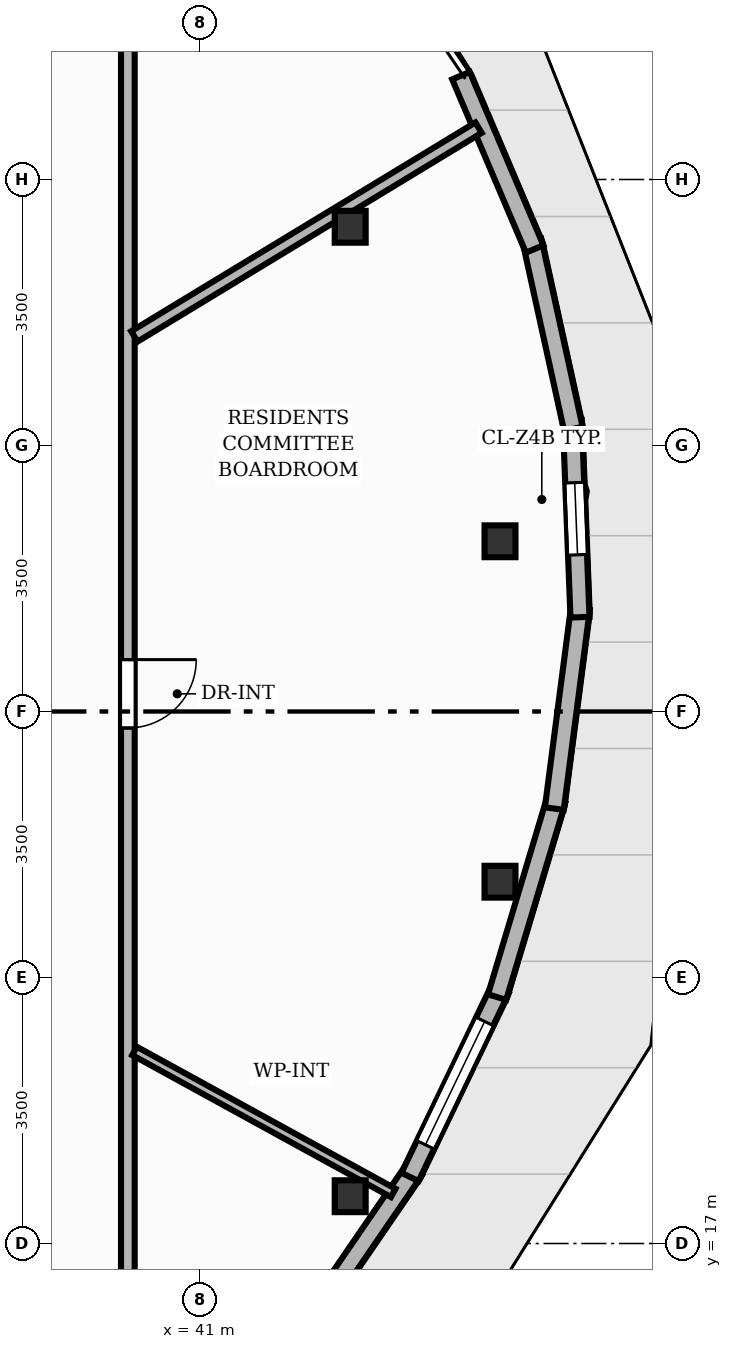
"""IFC4 building model, lengths in metres.
Left out: names, types, materials, properties, quantities, classifications, styles, units other than length and angle.
Written with IfcOpenShell. Run it as: python <this file> out.ifc"""

import sys

from ifc_helpers import new_model, si_unit, direction, frame, frame_2d, origin, origin_2d, place, context, subcontext, project, spatial, rectangle, i_section, extrude, element, fill, save


model = new_model("IFC4")
c1 = context("Model", 3, precision=1e-05, world=origin(), true_north=direction((0.0, 1.0)))
c2 = subcontext(c1, "Body", "Model", "MODEL_VIEW")
j1 = project(units=[si_unit("LENGTHUNIT", "METRE"), si_unit("PLANEANGLEUNIT", "RADIAN")], contexts=[c1])
p1 = place(None, origin())
s1 = spatial("IfcSite", under=j1, at=p1, CompositionType="ELEMENT")
p2 = place(p1, origin())
s2 = spatial("IfcBuilding", under=s1, at=p2, CompositionType="ELEMENT")
p3 = place(p2, frame((0.0, 0.0, 204.64)))
s3 = spatial("IfcBuildingStorey", under=s2, at=p3, CompositionType="ELEMENT", Elevation=204.64)
for number, where, z_axis, x_axis in (
    (1, (44.946, 26.24, 0.0), (0.0, 0.0, 1.0), (1.0, 0.0, 0.0)),
    (2, (42.975, 30.378, 0.0), (0.0, 0.0, 1.0), (1.0, 0.0, 0.0)),
    (3, (42.975, 17.622, 0.0), (0.0, 0.0, 1.0), (1.0, 0.0, 0.0)),
    (4, (44.946, 21.76, 0.0), (0.0, 0.0, 1.0), (1.0, 0.0, 0.0)),
):
    element("IfcColumn", number, at=place(p3, frame(where, z_axis=z_axis, x_axis=x_axis)), inside=s3, PredefinedType="COLUMN", context=c2, shape_type="SweptSolid", body=[
        extrude(i_section(OverallWidth=0.407, OverallDepth=0.419, WebThickness=0.031, FlangeThickness=0.049, at=origin_2d()), origin(), (0.0, 0.0, 1.0), 3.2),
    ])
p4 = place(p3, frame((43.817, 17.97, 0.0), z_axis=(0.0, 0.0, 1.0), x_axis=(-0.565115417993, -0.825011857095, 0.0)))
e5 = element("IfcWall", 5, at=p4, inside=s3, PredefinedType="SOLIDWALL", context=c2, shape_type="SweptSolid", body=[
    extrude(rectangle(XDim=2.758, YDim=0.25, at=frame_2d((1.379, 0.0))), origin(), (0.0, 0.0, 1.0), 2.96),
])
p5 = place(p3, frame((44.948, 20.344, 0.0), z_axis=(0.0, 0.0, 1.0), x_axis=(-0.432820910529, -0.901479927347, 0.0)))
e6 = element("IfcWall", 6, at=p5, inside=s3, PredefinedType="SOLIDWALL", context=c2, shape_type="SweptSolid", body=[
    extrude(rectangle(XDim=2.739, YDim=0.25, at=frame_2d((1.369, 0.0))), origin(), (0.0, 0.0, 1.0), 2.96),
])
p6 = place(p5, frame((0.469, 0.0, 0.85)))
e7 = element("IfcOpeningElement", 7, at=p6, cuts=e6, PredefinedType="OPENING", context=c2, shape_type="SweptSolid", body=[
    extrude(rectangle(XDim=1.8, YDim=2.0, at=frame_2d((0.9, 1.0))), frame((0.0, 0.135, 0.0), z_axis=(0.0, -1.0, 0.0), x_axis=(1.0, 0.0, 0.0)), (0.0, 0.0, 1.0), 0.27),
])
p7 = place(p3, frame((45.684, 22.83, 0.0), z_axis=(0.0, 0.0, 1.0), x_axis=(-0.287206932984, -0.957868559692, 0.0)))
e8 = element("IfcWall", 8, at=p7, inside=s3, PredefinedType="SOLIDWALL", context=c2, shape_type="SweptSolid", body=[
    extrude(rectangle(XDim=2.701, YDim=0.25, at=frame_2d((1.351, 0.0))), origin(), (0.0, 0.0, 1.0), 2.577),
])
p8 = place(p3, frame((46.004, 25.352, 0.0), z_axis=(0.0, 0.0, 1.0), x_axis=(-0.129291941608, -0.991606572102, 0.0)))
e9 = element("IfcWall", 9, at=p8, inside=s3, PredefinedType="SOLIDWALL", context=c2, shape_type="SweptSolid", body=[
    extrude(rectangle(XDim=2.651, YDim=0.25, at=frame_2d((1.326, 0.0))), origin(), (0.0, 0.0, 1.0), 2.96),
])
p9 = place(p3, frame((45.897, 27.831, 0.0), z_axis=(0.0, 0.0, 1.0), x_axis=(0.0391781915, -0.999232239928, 0.0)))
e10 = element("IfcWall", 10, at=p9, inside=s3, PredefinedType="SOLIDWALL", context=c2, shape_type="SweptSolid", body=[
    extrude(rectangle(XDim=2.592, YDim=0.25, at=frame_2d((1.296, 0.0))), origin(), (0.0, 0.0, 1.0), 2.96),
])
p10 = place(p9, frame((0.821, 0.0, 0.85)))
e11 = element("IfcOpeningElement", 11, at=p10, cuts=e10, PredefinedType="OPENING", context=c2, shape_type="SweptSolid", body=[
    extrude(rectangle(XDim=0.95, YDim=1.45, at=frame_2d((0.475, 0.725))), frame((0.0, 0.135, 0.0), z_axis=(0.0, -1.0, 0.0), x_axis=(1.0, 0.0, 0.0)), (0.0, 0.0, 1.0), 0.27),
])
p11 = place(p3, frame((45.368, 30.193, 0.0), z_axis=(0.0, 0.0, 1.0), x_axis=(0.214642879542, -0.976692599676, 0.0)))
e12 = element("IfcWall", 12, at=p11, inside=s3, PredefinedType="SOLIDWALL", context=c2, shape_type="SweptSolid", body=[
    extrude(rectangle(XDim=2.532, YDim=0.25, at=frame_2d((1.266, 0.0))), origin(), (0.0, 0.0, 1.0), 2.96),
])
p12 = place(p3, frame((44.433, 32.366, 0.0), z_axis=(0.0, 0.0, 1.0), x_axis=(0.391230346066, -0.920292788365, 0.0)))
e13 = element("IfcWall", 13, at=p12, inside=s3, PredefinedType="SOLIDWALL", context=c2, shape_type="SweptSolid", body=[
    extrude(rectangle(XDim=2.478, YDim=0.25, at=frame_2d((1.239, 0.0))), origin(), (0.0, 0.0, 1.0), 2.96),
])
p13 = place(p3, frame((40.05, 33.55, 0.0), z_axis=(0.0, 0.0, 1.0), x_axis=(0.0, -1.0, 0.0)))
e14 = element("IfcWall", 14, at=p13, inside=s3, PredefinedType="PARTITIONING", context=c2, shape_type="SweptSolid", body=[
    extrude(rectangle(XDim=19.1, YDim=0.18, at=frame_2d((9.55, 0.0))), origin(), (0.0, 0.0, 1.0), 2.955),
])
p14 = place(p13, frame((8.867, 0.0, 0.0)))
e15 = element("IfcOpeningElement", 15, at=p14, cuts=e14, PredefinedType="OPENING", context=c2, shape_type="SweptSolid", body=[
    extrude(rectangle(XDim=0.9, YDim=2.1, at=frame_2d((0.45, 1.05))), frame((0.0, 0.1, 0.0), z_axis=(0.0, -1.0, 0.0), x_axis=(1.0, 0.0, 0.0)), (0.0, 0.0, 1.0), 0.2),
])
p15 = place(p3, frame((40.138, 19.534, 0.0), z_axis=(0.0, 0.0, 1.0), x_axis=(0.876643036825, -0.481141336809, 0.0)))
e16 = element("IfcWall", 16, at=p15, inside=s3, PredefinedType="PARTITIONING", context=c2, shape_type="SweptSolid", body=[
    extrude(rectangle(XDim=3.883, YDim=0.125, at=frame_2d((1.941, 0.0))), origin(), (0.0, 0.0, 1.0), 2.404),
])
p16 = place(p3, frame((40.135, 28.935, 0.0), z_axis=(0.0, 0.0, 1.0), x_axis=(0.854997779071, 0.518631659064, 0.0)))
e17 = element("IfcWall", 17, at=p16, inside=s3, PredefinedType="PLUMBINGWALL", context=c2, shape_type="SweptSolid", body=[
    extrude(rectangle(XDim=5.296, YDim=0.16, at=frame_2d((2.648, 0.0))), origin(), (0.0, 0.0, 1.0), 2.404),
])
p17 = place(p6, origin())
e18 = element("IfcWindow", 18, at=p17, inside=s3, PartitioningType="SINGLE_PANEL", PredefinedType="WINDOW", context=c2, shape_type="SweptSolid", body=[
    extrude(rectangle(XDim=1.8, YDim=2.0, at=frame_2d((0.9, 1.0))), frame((0.0, 0.03, 0.0), z_axis=(0.0, -1.0, 0.0), x_axis=(1.0, 0.0, 0.0)), (0.0, 0.0, 1.0), 0.06),
])
fill(e7, e18)
p18 = place(p10, origin())
e19 = element("IfcWindow", 19, at=p18, inside=s3, PartitioningType="SINGLE_PANEL", PredefinedType="WINDOW", context=c2, shape_type="SweptSolid", body=[
    extrude(rectangle(XDim=0.95, YDim=1.45, at=frame_2d((0.475, 0.725))), frame((0.0, 0.03, 0.0), z_axis=(0.0, -1.0, 0.0), x_axis=(1.0, 0.0, 0.0)), (0.0, 0.0, 1.0), 0.06),
])
fill(e11, e19)
p19 = place(p14, origin())
e20 = element("IfcDoor", 20, at=p19, inside=s3, OperationType="SINGLE_SWING_LEFT", PredefinedType="DOOR", context=c2, shape_type="SweptSolid", body=[
    extrude(rectangle(XDim=0.9, YDim=2.1, at=frame_2d((0.45, 1.05))), frame((0.0, 0.025, 0.0), z_axis=(0.0, -1.0, 0.0), x_axis=(1.0, 0.0, 0.0)), (0.0, 0.0, 1.0), 0.05),
])
fill(e15, e20)
save(model, sys.argv[1])
